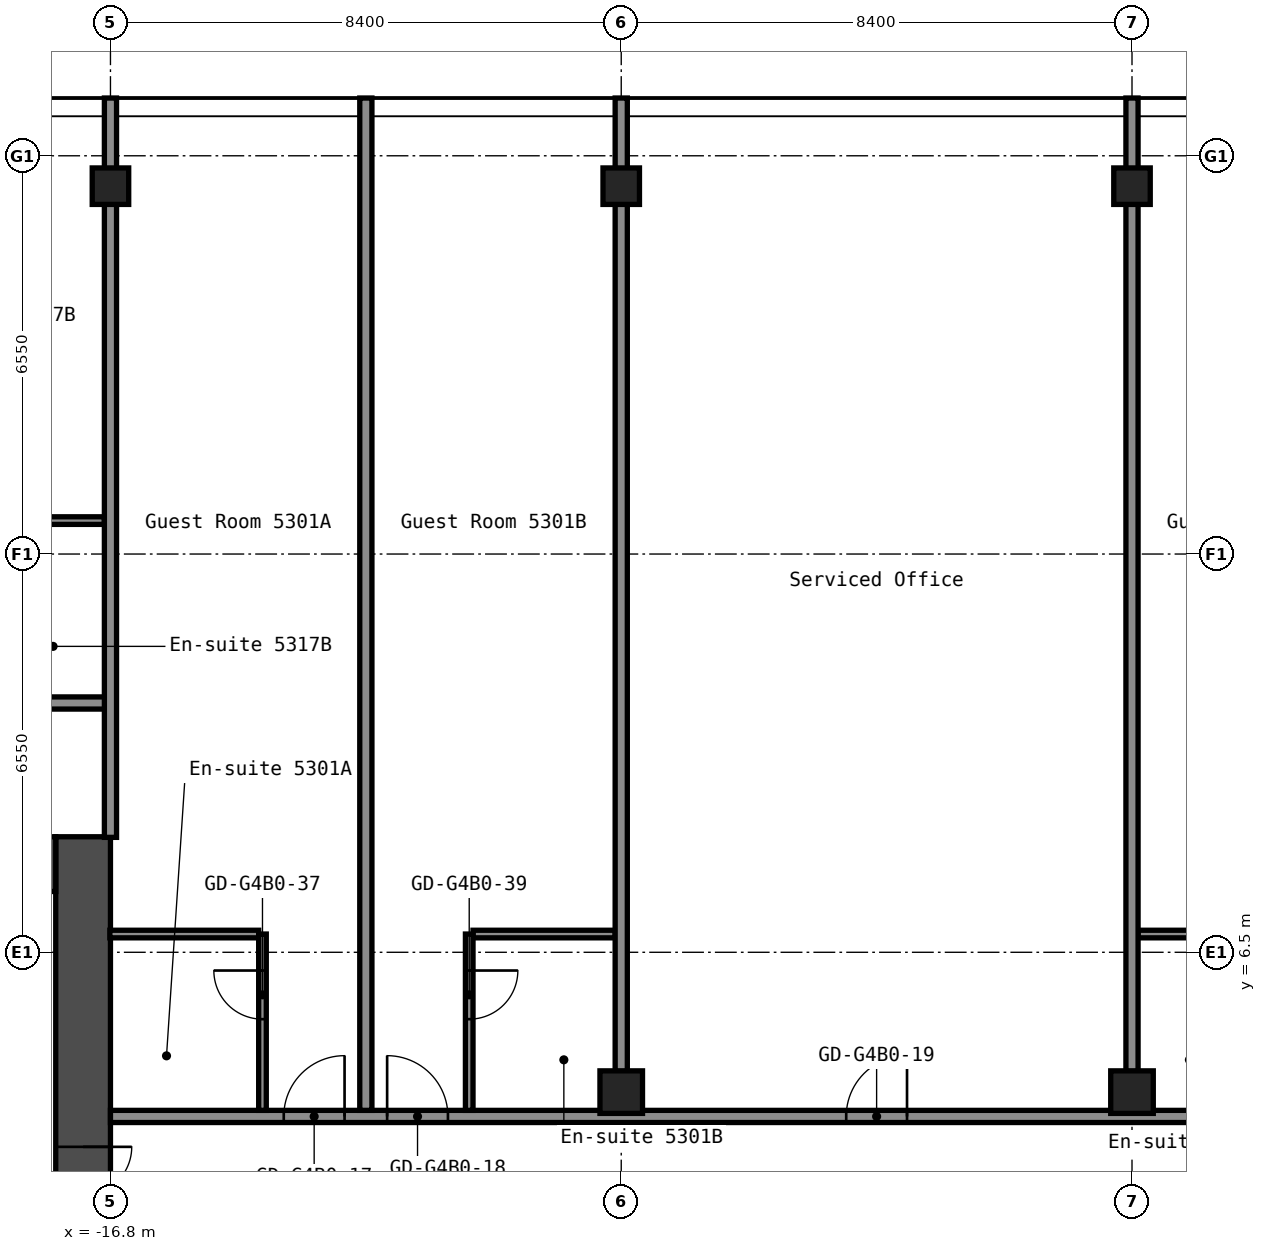
"""IFC4 building model, lengths in metres.
Left out: names, types, materials, properties, quantities, classifications, styles, units other than length and angle.
Written with IfcOpenShell. Run it as: python <this file> out.ifc"""

import sys

from ifc_helpers import new_model, si_unit, direction, frame, frame_2d, origin, origin_2d, place, context, subcontext, project, spatial, rectangle, hollow_rectangle, extrude, element, fill, save


model = new_model("IFC4")
c1 = context("Model", 3, precision=1e-05, world=origin(), true_north=direction((0.0, 1.0)))
c2 = subcontext(c1, "Body", "Model", "MODEL_VIEW")
j1 = project(units=[si_unit("LENGTHUNIT", "METRE"), si_unit("PLANEANGLEUNIT", "RADIAN")], contexts=[c1])
p1 = place(None, origin())
s1 = spatial("IfcSite", under=j1, at=p1, CompositionType="ELEMENT")
p2 = place(p1, origin())
s2 = spatial("IfcBuilding", under=s1, at=p2, CompositionType="ELEMENT")
p3 = place(p2, frame((0.0, 0.0, 189.8)))
s3 = spatial("IfcBuildingStorey", under=s2, at=p3, CompositionType="ELEMENT", Elevation=189.8)
p4 = place(p3, frame((-16.8, 19.1, 0.0), z_axis=(0.0, 0.0, 1.0), x_axis=(1.0, 0.0, 0.0)))
e1 = element("IfcColumn", 1, at=p4, inside=s3, PredefinedType="COLUMN", context=c2, shape_type="SweptSolid", body=[
    extrude(hollow_rectangle(XDim=0.6, YDim=0.6, WallThickness=0.025, InnerFilletRadius=0.038, OuterFilletRadius=0.062, at=origin_2d()), origin(), (0.0, 0.0, 1.0), 2.75),
])
p5 = place(p3, frame((-8.4, 4.2, 0.0), z_axis=(0.0, 0.0, 1.0), x_axis=(1.0, 0.0, 0.0)))
e2 = element("IfcColumn", 2, at=p5, inside=s3, PredefinedType="COLUMN", context=c2, shape_type="SweptSolid", body=[
    extrude(hollow_rectangle(XDim=0.7, YDim=0.7, WallThickness=0.028, at=origin_2d()), origin(), (0.0, 0.0, 1.0), 2.75),
])
p6 = place(p3, frame((-8.4, 19.1, 0.0), z_axis=(0.0, 0.0, 1.0), x_axis=(1.0, 0.0, 0.0)))
e3 = element("IfcColumn", 3, at=p6, inside=s3, PredefinedType="COLUMN", context=c2, shape_type="SweptSolid", body=[
    extrude(hollow_rectangle(XDim=0.6, YDim=0.6, WallThickness=0.025, InnerFilletRadius=0.038, OuterFilletRadius=0.062, at=origin_2d()), origin(), (0.0, 0.0, 1.0), 2.75),
])
p7 = place(p3, frame((0.0, 4.2, 0.0), z_axis=(0.0, 0.0, 1.0), x_axis=(1.0, 0.0, 0.0)))
e4 = element("IfcColumn", 4, at=p7, inside=s3, PredefinedType="COLUMN", context=c2, shape_type="SweptSolid", body=[
    extrude(hollow_rectangle(XDim=0.7, YDim=0.7, WallThickness=0.028, at=origin_2d()), origin(), (0.0, 0.0, 1.0), 2.75),
])
p8 = place(p3, frame((0.0, 19.1, 0.0), z_axis=(0.0, 0.0, 1.0), x_axis=(1.0, 0.0, 0.0)))
e5 = element("IfcColumn", 5, at=p8, inside=s3, PredefinedType="COLUMN", context=c2, shape_type="SweptSolid", body=[
    extrude(hollow_rectangle(XDim=0.6, YDim=0.6, WallThickness=0.025, InnerFilletRadius=0.038, OuterFilletRadius=0.062, at=origin_2d()), origin(), (0.0, 0.0, 1.0), 2.75),
])
p9 = place(p3, frame((-17.25, -8.4, 0.0), z_axis=(0.0, 0.0, 1.0), x_axis=(0.0, 1.0, 0.0)))
e6 = element("IfcWall", 6, at=p9, inside=s3, PredefinedType="SHEAR", context=c2, shape_type="SweptSolid", body=[
    extrude(rectangle(XDim=16.8, YDim=0.9, at=frame_2d((8.4, 0.0))), origin(), (0.0, 0.0, 1.0), 2.75),
])
p10 = place(p9, frame((10.1, 0.0, 0.0)))
e7 = element("IfcOpeningElement", 7, at=p10, cuts=e6, PredefinedType="OPENING", context=c2, shape_type="SweptSolid", body=[
    extrude(rectangle(XDim=1.6, YDim=2.1, at=frame_2d((0.8, 1.05))), frame((0.0, 0.46, 0.0), z_axis=(0.0, -1.0, 0.0), x_axis=(1.0, 0.0, 0.0)), (0.0, 0.0, 1.0), 0.92),
])
p11 = place(p3, frame((-32.7, 7.95, 0.0), z_axis=(0.0, 0.0, 1.0), x_axis=(1.0, 0.0, 0.0)))
e8 = element("IfcWall", 8, at=p11, inside=s3, PredefinedType="SHEAR", context=c2, shape_type="SweptSolid", body=[
    extrude(rectangle(XDim=15.0, YDim=0.9, at=frame_2d((7.5, 0.0))), origin(), (0.0, 0.0, 1.0), 2.75),
])
p12 = place(p11, frame((3.4, 0.0, 0.0)))
e9 = element("IfcOpeningElement", 9, at=p12, cuts=e8, PredefinedType="OPENING", context=c2, shape_type="SweptSolid", body=[
    extrude(rectangle(XDim=1.2, YDim=2.1, at=frame_2d((0.6, 1.05))), frame((0.0, 0.46, 0.0), z_axis=(0.0, -1.0, 0.0), x_axis=(1.0, 0.0, 0.0)), (0.0, 0.0, 1.0), 0.92),
])
p13 = place(p11, frame((0.75, 0.0, 0.0)))
e10 = element("IfcOpeningElement", 10, at=p13, cuts=e8, PredefinedType="OPENING", context=c2, shape_type="SweptSolid", body=[
    extrude(rectangle(XDim=0.9, YDim=2.1, at=frame_2d((0.45, 1.05))), frame((0.0, 0.46, 0.0), z_axis=(0.0, -1.0, 0.0), x_axis=(1.0, 0.0, 0.0)), (0.0, 0.0, 1.0), 0.92),
])
p14 = place(p3, frame((-16.8, 3.8, 0.0), z_axis=(0.0, 0.0, 1.0), x_axis=(1.0, 0.0, 0.0)))
e11 = element("IfcWall", 11, at=p14, inside=s3, PredefinedType="PARTITIONING", context=c2, shape_type="SweptSolid", body=[
    extrude(rectangle(XDim=33.6, YDim=0.2, at=frame_2d((16.8, 0.0))), origin(), (0.0, 0.0, 1.0), 2.75),
])
p15 = place(p14, frame((2.85, 0.0, 0.0)))
e12 = element("IfcOpeningElement", 12, at=p15, cuts=e11, PredefinedType="OPENING", context=c2, shape_type="SweptSolid", body=[
    extrude(rectangle(XDim=1.0, YDim=2.1, at=frame_2d((0.5, 1.05))), frame((0.0, 0.11, 0.0), z_axis=(0.0, -1.0, 0.0), x_axis=(1.0, 0.0, 0.0)), (0.0, 0.0, 1.0), 0.22),
])
p16 = place(p14, frame((4.55, 0.0, 0.0)))
e13 = element("IfcOpeningElement", 13, at=p16, cuts=e11, PredefinedType="OPENING", context=c2, shape_type="SweptSolid", body=[
    extrude(rectangle(XDim=1.0, YDim=2.1, at=frame_2d((0.5, 1.05))), frame((0.0, 0.11, 0.0), z_axis=(0.0, -1.0, 0.0), x_axis=(1.0, 0.0, 0.0)), (0.0, 0.0, 1.0), 0.22),
])
p17 = place(p14, frame((12.1, 0.0, 0.0)))
e14 = element("IfcOpeningElement", 14, at=p17, cuts=e11, PredefinedType="OPENING", context=c2, shape_type="SweptSolid", body=[
    extrude(rectangle(XDim=1.0, YDim=2.1, at=frame_2d((0.5, 1.05))), frame((0.0, 0.11, 0.0), z_axis=(0.0, -1.0, 0.0), x_axis=(1.0, 0.0, 0.0)), (0.0, 0.0, 1.0), 0.22),
])
p18 = place(p14, frame((19.65, 0.0, 0.0)))
e15 = element("IfcOpeningElement", 15, at=p18, cuts=e11, PredefinedType="OPENING", context=c2, shape_type="SweptSolid", body=[
    extrude(rectangle(XDim=1.0, YDim=2.1, at=frame_2d((0.5, 1.05))), frame((0.0, 0.11, 0.0), z_axis=(0.0, -1.0, 0.0), x_axis=(1.0, 0.0, 0.0)), (0.0, 0.0, 1.0), 0.22),
])
p19 = place(p14, frame((21.35, 0.0, 0.0)))
e16 = element("IfcOpeningElement", 16, at=p19, cuts=e11, PredefinedType="OPENING", context=c2, shape_type="SweptSolid", body=[
    extrude(rectangle(XDim=1.0, YDim=2.1, at=frame_2d((0.5, 1.05))), frame((0.0, 0.11, 0.0), z_axis=(0.0, -1.0, 0.0), x_axis=(1.0, 0.0, 0.0)), (0.0, 0.0, 1.0), 0.22),
])
p20 = place(p14, frame((28.05, 0.0, 0.0)))
e17 = element("IfcOpeningElement", 17, at=p20, cuts=e11, PredefinedType="OPENING", context=c2, shape_type="SweptSolid", body=[
    extrude(rectangle(XDim=1.0, YDim=2.1, at=frame_2d((0.5, 1.05))), frame((0.0, 0.11, 0.0), z_axis=(0.0, -1.0, 0.0), x_axis=(1.0, 0.0, 0.0)), (0.0, 0.0, 1.0), 0.22),
])
p21 = place(p14, frame((29.75, 0.0, 0.0)))
e18 = element("IfcOpeningElement", 18, at=p21, cuts=e11, PredefinedType="OPENING", context=c2, shape_type="SweptSolid", body=[
    extrude(rectangle(XDim=1.0, YDim=2.1, at=frame_2d((0.5, 1.05))), frame((0.0, 0.11, 0.0), z_axis=(0.0, -1.0, 0.0), x_axis=(1.0, 0.0, 0.0)), (0.0, 0.0, 1.0), 0.22),
])
p22 = place(p3, frame((-16.81, 6.8, 0.0), z_axis=(0.0, 0.0, 1.0), x_axis=(1.0, 0.0, 0.0)))
e19 = element("IfcWall", 19, at=p22, inside=s3, PredefinedType="PARTITIONING", context=c2, shape_type="SweptSolid", body=[
    extrude(rectangle(XDim=2.448, YDim=0.125, at=frame_2d((1.224, 0.0))), origin(), (0.0, 0.0, 1.0), 2.75),
])
for number, where, z_axis, x_axis in (
    (20, (-10.837, 6.8, 0.0), (0.0, 0.0, 1.0), (1.0, 0.0, 0.0)),
    (21, (0.1, 6.8, 0.0), (0.0, 0.0, 1.0), (1.0, 0.0, 0.0)),
):
    element("IfcWall", number, at=place(p3, frame(where, z_axis=z_axis, x_axis=x_axis)), inside=s3, PredefinedType="PARTITIONING", context=c2, shape_type="SweptSolid", body=[
        extrude(rectangle(XDim=2.337, YDim=0.125, at=frame_2d((1.169, 0.0))), origin(), (0.0, 0.0, 1.0), 2.75),
    ])
p23 = place(p3, frame((-38.1, 10.6, 0.0), z_axis=(0.0, 0.0, 1.0), x_axis=(1.0, 0.0, 0.0)))
e22 = element("IfcWall", 22, at=p23, inside=s3, PredefinedType="PARTITIONING", context=c2, shape_type="SweptSolid", body=[
    extrude(rectangle(XDim=21.3, YDim=0.2, at=frame_2d((10.65, 0.0))), origin(), (0.0, 0.0, 1.0), 2.75),
])
p24 = place(p23, frame((1.95, 0.0, 0.0)))
e23 = element("IfcOpeningElement", 23, at=p24, cuts=e22, PredefinedType="OPENING", context=c2, shape_type="SweptSolid", body=[
    extrude(rectangle(XDim=0.9, YDim=2.1, at=frame_2d((0.45, 1.05))), frame((0.0, 0.11, 0.0), z_axis=(0.0, -1.0, 0.0), x_axis=(1.0, 0.0, 0.0)), (0.0, 0.0, 1.0), 0.22),
])
p25 = place(p23, frame((7.35, 0.0, 0.0)))
e24 = element("IfcOpeningElement", 24, at=p25, cuts=e22, PredefinedType="OPENING", context=c2, shape_type="SweptSolid", body=[
    extrude(rectangle(XDim=1.0, YDim=2.1, at=frame_2d((0.5, 1.05))), frame((0.0, 0.11, 0.0), z_axis=(0.0, -1.0, 0.0), x_axis=(1.0, 0.0, 0.0)), (0.0, 0.0, 1.0), 0.22),
])
p26 = place(p23, frame((9.05, 0.0, 0.0)))
e25 = element("IfcOpeningElement", 25, at=p26, cuts=e22, PredefinedType="OPENING", context=c2, shape_type="SweptSolid", body=[
    extrude(rectangle(XDim=1.0, YDim=2.1, at=frame_2d((0.5, 1.05))), frame((0.0, 0.11, 0.0), z_axis=(0.0, -1.0, 0.0), x_axis=(1.0, 0.0, 0.0)), (0.0, 0.0, 1.0), 0.22),
])
p27 = place(p23, frame((15.75, 0.0, 0.0)))
e26 = element("IfcOpeningElement", 26, at=p27, cuts=e22, PredefinedType="OPENING", context=c2, shape_type="SweptSolid", body=[
    extrude(rectangle(XDim=1.0, YDim=2.1, at=frame_2d((0.5, 1.05))), frame((0.0, 0.11, 0.0), z_axis=(0.0, -1.0, 0.0), x_axis=(1.0, 0.0, 0.0)), (0.0, 0.0, 1.0), 0.22),
])
p28 = place(p23, frame((17.45, 0.0, 0.0)))
e27 = element("IfcOpeningElement", 27, at=p28, cuts=e22, PredefinedType="OPENING", context=c2, shape_type="SweptSolid", body=[
    extrude(rectangle(XDim=1.0, YDim=2.1, at=frame_2d((0.5, 1.05))), frame((0.0, 0.11, 0.0), z_axis=(0.0, -1.0, 0.0), x_axis=(1.0, 0.0, 0.0)), (0.0, 0.0, 1.0), 0.22),
])
p29 = place(p3, frame((-19.238, 13.6, 0.0), z_axis=(0.0, 0.0, 1.0), x_axis=(1.0, 0.0, 0.0)))
e28 = element("IfcWall", 28, at=p29, inside=s3, PredefinedType="PARTITIONING", context=c2, shape_type="SweptSolid", body=[
    extrude(rectangle(XDim=2.338, YDim=0.125, at=frame_2d((1.169, 0.0))), origin(), (0.0, 0.0, 1.0), 2.75),
])
p30 = place(p3, frame((-16.8, 8.39, 0.0), z_axis=(0.0, 0.0, 1.0), x_axis=(0.0, 1.0, 0.0)))
e29 = element("IfcWall", 29, at=p30, inside=s3, PredefinedType="PARTITIONING", context=c2, shape_type="SweptSolid", body=[
    extrude(rectangle(XDim=12.16, YDim=0.2, at=frame_2d((6.08, 0.0))), origin(), (0.0, 0.0, 1.0), 2.75),
])
p31 = place(p3, frame((-14.3, 3.9, 0.0), z_axis=(0.0, 0.0, 1.0), x_axis=(0.0, 1.0, 0.0)))
e30 = element("IfcWall", 30, at=p31, inside=s3, PredefinedType="PARTITIONING", context=c2, shape_type="SweptSolid", body=[
    extrude(rectangle(XDim=2.9, YDim=0.125, at=frame_2d((1.45, 0.0))), origin(), (0.0, 0.0, 1.0), 2.75),
])
p32 = place(p31, frame((1.5, 0.0, 0.0)))
e31 = element("IfcOpeningElement", 31, at=p32, cuts=e30, PredefinedType="OPENING", context=c2, shape_type="SweptSolid", body=[
    extrude(rectangle(XDim=0.8, YDim=2.1, at=frame_2d((0.4, 1.05))), frame((0.0, 0.073, 0.0), z_axis=(0.0, -1.0, 0.0), x_axis=(1.0, 0.0, 0.0)), (0.0, 0.0, 1.0), 0.145),
])
p33 = place(p3, frame((-12.6, 3.9, 0.0), z_axis=(0.0, 0.0, 1.0), x_axis=(0.0, 1.0, 0.0)))
e32 = element("IfcWall", 32, at=p33, inside=s3, PredefinedType="PARTITIONING", context=c2, shape_type="SweptSolid", body=[
    extrude(rectangle(XDim=16.65, YDim=0.2, at=frame_2d((8.325, 0.0))), origin(), (0.0, 0.0, 1.0), 2.75),
])
p34 = place(p3, frame((-10.9, 3.9, 0.0), z_axis=(0.0, 0.0, 1.0), x_axis=(0.0, 1.0, 0.0)))
e33 = element("IfcWall", 33, at=p34, inside=s3, PredefinedType="PARTITIONING", context=c2, shape_type="SweptSolid", body=[
    extrude(rectangle(XDim=2.9, YDim=0.125, at=frame_2d((1.45, 0.0))), origin(), (0.0, 0.0, 1.0), 2.75),
])
p35 = place(p34, frame((1.5, 0.0, 0.0)))
e34 = element("IfcOpeningElement", 34, at=p35, cuts=e33, PredefinedType="OPENING", context=c2, shape_type="SweptSolid", body=[
    extrude(rectangle(XDim=0.8, YDim=2.1, at=frame_2d((0.4, 1.05))), frame((0.0, 0.073, 0.0), z_axis=(0.0, -1.0, 0.0), x_axis=(1.0, 0.0, 0.0)), (0.0, 0.0, 1.0), 0.145),
])
for number, where, z_axis, x_axis in (
    (35, (-8.4, 4.54, 0.0), (0.0, 0.0, 1.0), (0.0, 1.0, 0.0)),
    (36, (0.0, 4.54, 0.0), (0.0, 0.0, 1.0), (0.0, 1.0, 0.0)),
):
    element("IfcWall", number, at=place(p3, frame(where, z_axis=z_axis, x_axis=x_axis)), inside=s3, PredefinedType="PARTITIONING", context=c2, shape_type="SweptSolid", body=[
        extrude(rectangle(XDim=16.01, YDim=0.2, at=frame_2d((8.005, 0.0))), origin(), (0.0, 0.0, 1.0), 2.75),
    ])
p36 = place(p10, origin())
e37 = element("IfcDoor", 37, at=p36, inside=s3, OperationType="DOUBLE_DOOR_SINGLE_SWING", PredefinedType="DOOR", context=c2, shape_type="SweptSolid", body=[
    extrude(rectangle(XDim=1.6, YDim=2.1, at=frame_2d((0.8, 1.05))), frame((0.0, 0.025, 0.0), z_axis=(0.0, -1.0, 0.0), x_axis=(1.0, 0.0, 0.0)), (0.0, 0.0, 1.0), 0.05),
])
fill(e7, e37)
p37 = place(p15, origin())
e38 = element("IfcDoor", 38, at=p37, inside=s3, OperationType="SINGLE_SWING_LEFT", PredefinedType="DOOR", context=c2, shape_type="SweptSolid", body=[
    extrude(rectangle(XDim=1.0, YDim=2.1, at=frame_2d((0.5, 1.05))), frame((0.0, 0.025, 0.0), z_axis=(0.0, -1.0, 0.0), x_axis=(1.0, 0.0, 0.0)), (0.0, 0.0, 1.0), 0.05),
])
fill(e12, e38)
p38 = place(p16, origin())
e39 = element("IfcDoor", 39, at=p38, inside=s3, OperationType="SINGLE_SWING_RIGHT", PredefinedType="DOOR", context=c2, shape_type="SweptSolid", body=[
    extrude(rectangle(XDim=1.0, YDim=2.1, at=frame_2d((0.5, 1.05))), frame((0.0, 0.025, 0.0), z_axis=(0.0, -1.0, 0.0), x_axis=(1.0, 0.0, 0.0)), (0.0, 0.0, 1.0), 0.05),
])
fill(e13, e39)
p39 = place(p17, origin())
e40 = element("IfcDoor", 40, at=p39, inside=s3, OperationType="SINGLE_SWING_LEFT", PredefinedType="DOOR", context=c2, shape_type="SweptSolid", body=[
    extrude(rectangle(XDim=1.0, YDim=2.1, at=frame_2d((0.5, 1.05))), frame((0.0, 0.025, 0.0), z_axis=(0.0, -1.0, 0.0), x_axis=(1.0, 0.0, 0.0)), (0.0, 0.0, 1.0), 0.05),
])
fill(e14, e40)
p40 = place(p32, origin())
e41 = element("IfcDoor", 41, at=p40, inside=s3, OperationType="SINGLE_SWING_LEFT", PredefinedType="DOOR", context=c2, shape_type="SweptSolid", body=[
    extrude(rectangle(XDim=0.8, YDim=2.1, at=frame_2d((0.4, 1.05))), frame((0.0, 0.025, 0.0), z_axis=(0.0, -1.0, 0.0), x_axis=(1.0, 0.0, 0.0)), (0.0, 0.0, 1.0), 0.05),
])
fill(e31, e41)
p41 = place(p35, origin())
e42 = element("IfcDoor", 42, at=p41, inside=s3, OperationType="SINGLE_SWING_RIGHT", PredefinedType="DOOR", context=c2, shape_type="SweptSolid", body=[
    extrude(rectangle(XDim=0.8, YDim=2.1, at=frame_2d((0.4, 1.05))), frame((0.0, 0.025, 0.0), z_axis=(0.0, -1.0, 0.0), x_axis=(1.0, 0.0, 0.0)), (0.0, 0.0, 1.0), 0.05),
])
fill(e34, e42)
save(model, sys.argv[1])
